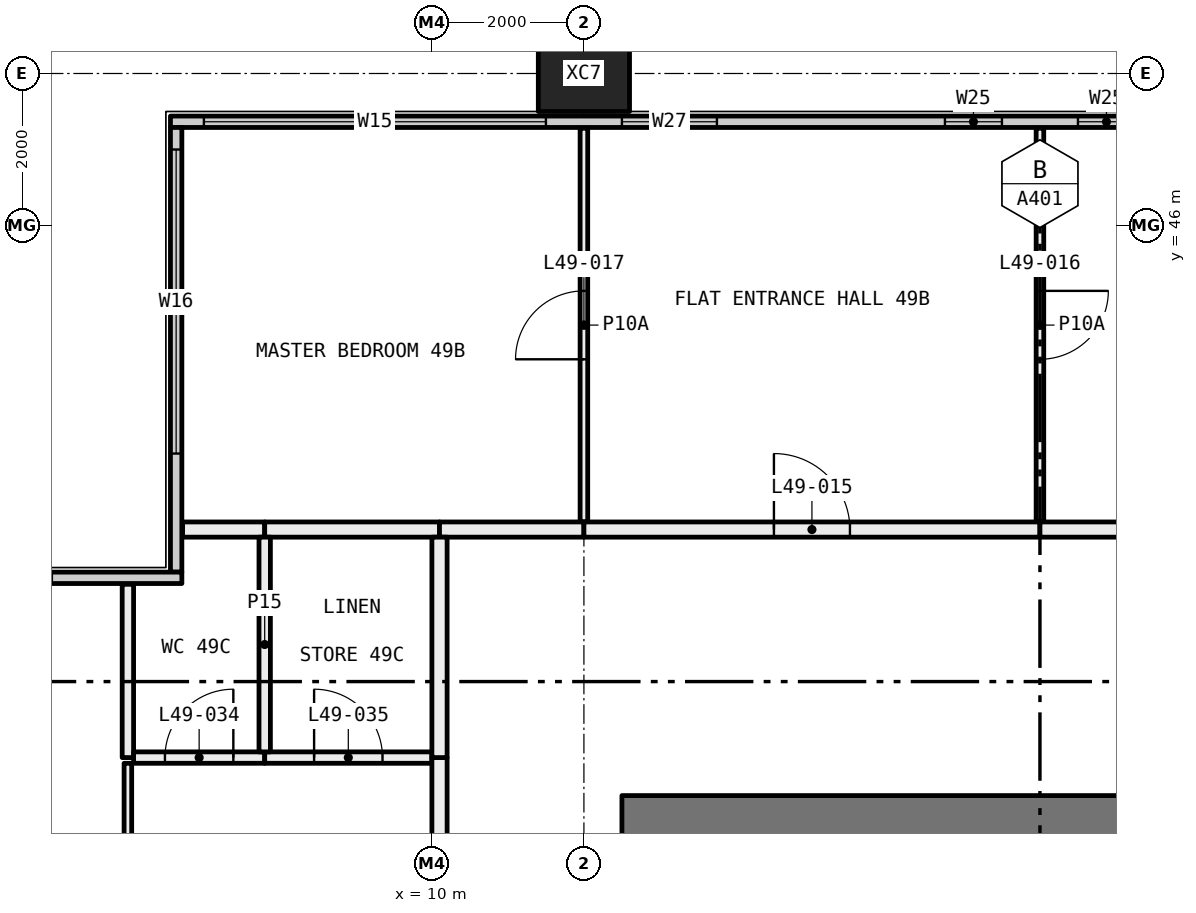
"""IFC4 building model, lengths in metres.
Left out: names, types, materials, properties, quantities, classifications, styles, units other than length and angle.
Written with IfcOpenShell. Run it as: python <this file> out.ifc"""

import sys

from ifc_helpers import new_model, si_unit, direction, frame, frame_2d, origin, origin_2d, place, context, subcontext, project, spatial, rectangle, hollow_rectangle, extrude, element, fill, save


model = new_model("IFC4")
c1 = context("Model", 3, precision=1e-05, world=origin(), true_north=direction((0.0, 1.0)))
c2 = subcontext(c1, "Body", "Model", "MODEL_VIEW")
j1 = project(units=[si_unit("LENGTHUNIT", "METRE"), si_unit("PLANEANGLEUNIT", "RADIAN")], contexts=[c1])
p1 = place(None, origin())
s1 = spatial("IfcSite", under=j1, at=p1, CompositionType="ELEMENT")
p2 = place(p1, origin())
s2 = spatial("IfcBuilding", under=s1, at=p2, CompositionType="ELEMENT")
p3 = place(p2, frame((0.0, 0.0, 185.85)))
s3 = spatial("IfcBuildingStorey", under=s2, at=p3, CompositionType="ELEMENT", Elevation=185.85)
p4 = place(p3, frame((12.0, 48.0, -0.4), z_axis=(0.0, 0.0, 1.0), x_axis=(1.0, 0.0, 0.0)))
e1 = element("IfcColumn", 1, at=p4, inside=s3, PredefinedType="COLUMN", context=c2, shape_type="SweptSolid", body=[
    extrude(hollow_rectangle(XDim=1.2, YDim=1.0, WallThickness=0.045, at=origin_2d()), origin(), (0.0, 0.0, 1.0), 3.45),
])
p5 = place(p3, frame((6.56, 47.365, 0.0), z_axis=(0.0, 0.0, 1.0), x_axis=(1.0, 0.0, 0.0)))
e2 = element("IfcWall", 2, at=p5, inside=s3, PredefinedType="ELEMENTEDWALL", context=c2, shape_type="SweptSolid", body=[
    extrude(rectangle(XDim=46.88, YDim=0.15, at=frame_2d((23.44, 0.0))), origin(), (0.0, 0.0, 1.0), 3.05),
])
p6 = place(p5, frame((0.44, 0.0, 0.45)))
e3 = element("IfcOpeningElement", 3, at=p6, cuts=e2, PredefinedType="OPENING", context=c2, shape_type="SweptSolid", body=[
    extrude(rectangle(XDim=4.5, YDim=2.55, at=frame_2d((2.25, 1.275))), frame((0.0, 0.085, 0.0), z_axis=(0.0, -1.0, 0.0), x_axis=(1.0, 0.0, 0.0)), (0.0, 0.0, 1.0), 0.17),
])
p7 = place(p5, frame((5.94, 0.0, 0.45)))
e4 = element("IfcOpeningElement", 4, at=p7, cuts=e2, PredefinedType="OPENING", context=c2, shape_type="SweptSolid", body=[
    extrude(rectangle(XDim=1.25, YDim=2.55, at=frame_2d((0.625, 1.275))), frame((0.0, 0.085, 0.0), z_axis=(0.0, -1.0, 0.0), x_axis=(1.0, 0.0, 0.0)), (0.0, 0.0, 1.0), 0.17),
])
p8 = place(p5, frame((10.19, 0.0, 0.45)))
e5 = element("IfcOpeningElement", 5, at=p8, cuts=e2, PredefinedType="OPENING", context=c2, shape_type="SweptSolid", body=[
    extrude(rectangle(XDim=0.75, YDim=2.55, at=frame_2d((0.375, 1.275))), frame((0.0, 0.085, 0.0), z_axis=(0.0, -1.0, 0.0), x_axis=(1.0, 0.0, 0.0)), (0.0, 0.0, 1.0), 0.17),
])
p9 = place(p5, frame((11.94, 0.0, 0.45)))
e6 = element("IfcOpeningElement", 6, at=p9, cuts=e2, PredefinedType="OPENING", context=c2, shape_type="SweptSolid", body=[
    extrude(rectangle(XDim=0.75, YDim=2.55, at=frame_2d((0.375, 1.275))), frame((0.0, 0.085, 0.0), z_axis=(0.0, -1.0, 0.0), x_axis=(1.0, 0.0, 0.0)), (0.0, 0.0, 1.0), 0.17),
])
p10 = place(p5, frame((15.69, 0.0, 0.45)))
e7 = element("IfcOpeningElement", 7, at=p10, cuts=e2, PredefinedType="OPENING", context=c2, shape_type="SweptSolid", body=[
    extrude(rectangle(XDim=1.25, YDim=2.55, at=frame_2d((0.625, 1.275))), frame((0.0, 0.085, 0.0), z_axis=(0.0, -1.0, 0.0), x_axis=(1.0, 0.0, 0.0)), (0.0, 0.0, 1.0), 0.17),
])
p11 = place(p5, frame((17.94, 0.0, 0.45)))
e8 = element("IfcOpeningElement", 8, at=p11, cuts=e2, PredefinedType="OPENING", context=c2, shape_type="SweptSolid", body=[
    extrude(rectangle(XDim=1.25, YDim=2.55, at=frame_2d((0.625, 1.275))), frame((0.0, 0.085, 0.0), z_axis=(0.0, -1.0, 0.0), x_axis=(1.0, 0.0, 0.0)), (0.0, 0.0, 1.0), 0.17),
])
p12 = place(p5, frame((22.19, 0.0, 0.45)))
e9 = element("IfcOpeningElement", 9, at=p12, cuts=e2, PredefinedType="OPENING", context=c2, shape_type="SweptSolid", body=[
    extrude(rectangle(XDim=0.75, YDim=2.55, at=frame_2d((0.375, 1.275))), frame((0.0, 0.085, 0.0), z_axis=(0.0, -1.0, 0.0), x_axis=(1.0, 0.0, 0.0)), (0.0, 0.0, 1.0), 0.17),
])
p13 = place(p5, frame((23.94, 0.0, 0.45)))
e10 = element("IfcOpeningElement", 10, at=p13, cuts=e2, PredefinedType="OPENING", context=c2, shape_type="SweptSolid", body=[
    extrude(rectangle(XDim=0.75, YDim=2.55, at=frame_2d((0.375, 1.275))), frame((0.0, 0.085, 0.0), z_axis=(0.0, -1.0, 0.0), x_axis=(1.0, 0.0, 0.0)), (0.0, 0.0, 1.0), 0.17),
])
p14 = place(p5, frame((27.69, 0.0, 0.45)))
e11 = element("IfcOpeningElement", 11, at=p14, cuts=e2, PredefinedType="OPENING", context=c2, shape_type="SweptSolid", body=[
    extrude(rectangle(XDim=1.25, YDim=2.55, at=frame_2d((0.625, 1.275))), frame((0.0, 0.085, 0.0), z_axis=(0.0, -1.0, 0.0), x_axis=(1.0, 0.0, 0.0)), (0.0, 0.0, 1.0), 0.17),
])
p15 = place(p5, frame((29.94, 0.0, 0.45)))
e12 = element("IfcOpeningElement", 12, at=p15, cuts=e2, PredefinedType="OPENING", context=c2, shape_type="SweptSolid", body=[
    extrude(rectangle(XDim=1.25, YDim=2.55, at=frame_2d((0.625, 1.275))), frame((0.0, 0.085, 0.0), z_axis=(0.0, -1.0, 0.0), x_axis=(1.0, 0.0, 0.0)), (0.0, 0.0, 1.0), 0.17),
])
p16 = place(p5, frame((34.19, 0.0, 0.45)))
e13 = element("IfcOpeningElement", 13, at=p16, cuts=e2, PredefinedType="OPENING", context=c2, shape_type="SweptSolid", body=[
    extrude(rectangle(XDim=0.75, YDim=2.55, at=frame_2d((0.375, 1.275))), frame((0.0, 0.085, 0.0), z_axis=(0.0, -1.0, 0.0), x_axis=(1.0, 0.0, 0.0)), (0.0, 0.0, 1.0), 0.17),
])
p17 = place(p5, frame((35.94, 0.0, 0.45)))
e14 = element("IfcOpeningElement", 14, at=p17, cuts=e2, PredefinedType="OPENING", context=c2, shape_type="SweptSolid", body=[
    extrude(rectangle(XDim=0.75, YDim=2.55, at=frame_2d((0.375, 1.275))), frame((0.0, 0.085, 0.0), z_axis=(0.0, -1.0, 0.0), x_axis=(1.0, 0.0, 0.0)), (0.0, 0.0, 1.0), 0.17),
])
p18 = place(p5, frame((39.69, 0.0, 0.45)))
e15 = element("IfcOpeningElement", 15, at=p18, cuts=e2, PredefinedType="OPENING", context=c2, shape_type="SweptSolid", body=[
    extrude(rectangle(XDim=1.25, YDim=2.55, at=frame_2d((0.625, 1.275))), frame((0.0, 0.085, 0.0), z_axis=(0.0, -1.0, 0.0), x_axis=(1.0, 0.0, 0.0)), (0.0, 0.0, 1.0), 0.17),
])
p19 = place(p5, frame((41.94, 0.0, 0.45)))
e16 = element("IfcOpeningElement", 16, at=p19, cuts=e2, PredefinedType="OPENING", context=c2, shape_type="SweptSolid", body=[
    extrude(rectangle(XDim=4.5, YDim=2.55, at=frame_2d((2.25, 1.275))), frame((0.0, 0.085, 0.0), z_axis=(0.0, -1.0, 0.0), x_axis=(1.0, 0.0, 0.0)), (0.0, 0.0, 1.0), 0.17),
])
p20 = place(p3, frame((6.635, 41.44, 0.0), z_axis=(0.0, 0.0, 1.0), x_axis=(0.0, 1.0, 0.0)))
e17 = element("IfcWall", 17, at=p20, inside=s3, PredefinedType="ELEMENTEDWALL", context=c2, shape_type="SweptSolid", body=[
    extrude(rectangle(XDim=5.85, YDim=0.15, at=frame_2d((2.925, 0.0))), origin(), (0.0, 0.0, 1.0), 3.05),
])
p21 = place(p20, frame((1.56, 0.0, 0.45)))
e18 = element("IfcOpeningElement", 18, at=p21, cuts=e17, PredefinedType="OPENING", context=c2, shape_type="SweptSolid", body=[
    extrude(rectangle(XDim=4.0, YDim=2.55, at=frame_2d((2.0, 1.275))), frame((0.0, 0.085, 0.0), z_axis=(0.0, -1.0, 0.0), x_axis=(1.0, 0.0, 0.0)), (0.0, 0.0, 1.0), 0.17),
])
p22 = place(p3, frame((0.56, 41.365, 0.0), z_axis=(0.0, 0.0, 1.0), x_axis=(1.0, 0.0, 0.0)))
e19 = element("IfcWall", 19, at=p22, inside=s3, PredefinedType="ELEMENTEDWALL", context=c2, shape_type="SweptSolid", body=[
    extrude(rectangle(XDim=6.15, YDim=0.15, at=frame_2d((3.075, 0.0))), origin(), (0.0, 0.0, 1.0), 3.05),
])
p23 = place(p22, frame((0.44, 0.0, 0.45)))
e20 = element("IfcOpeningElement", 20, at=p23, cuts=e19, PredefinedType="OPENING", context=c2, shape_type="SweptSolid", body=[
    extrude(rectangle(XDim=4.0, YDim=2.55, at=frame_2d((2.0, 1.275))), frame((0.0, 0.085, 0.0), z_axis=(0.0, -1.0, 0.0), x_axis=(1.0, 0.0, 0.0)), (0.0, 0.0, 1.0), 0.17),
])
p24 = place(p3, frame((12.0, 42.1, 0.0), z_axis=(0.0, 0.0, 1.0), x_axis=(0.0, 1.0, 0.0)))
e21 = element("IfcWall", 21, at=p24, inside=s3, PredefinedType="PARTITIONING", context=c2, shape_type="SweptSolid", body=[
    extrude(rectangle(XDim=5.18, YDim=0.1, at=frame_2d((2.59, 0.0))), origin(), (0.0, 0.0, 1.0), 3.05),
])
p25 = place(p24, frame((2.14, 0.0, 0.0)))
e22 = element("IfcOpeningElement", 22, at=p25, cuts=e21, PredefinedType="OPENING", context=c2, shape_type="SweptSolid", body=[
    extrude(rectangle(XDim=0.9, YDim=2.1, at=frame_2d((0.45, 1.05))), frame((0.0, 0.06, 0.0), z_axis=(0.0, -1.0, 0.0), x_axis=(1.0, 0.0, 0.0)), (0.0, 0.0, 1.0), 0.12),
])
p26 = place(p3, frame((6.72, 42.0, 0.0), z_axis=(0.0, 0.0, 1.0), x_axis=(1.0, 0.0, 0.0)))
e23 = element("IfcWall", 23, at=p26, inside=s3, PredefinedType="PARTITIONING", context=c2, shape_type="SweptSolid", body=[
    extrude(rectangle(XDim=1.08, YDim=0.2, at=frame_2d((0.54, 0.0))), origin(), (0.0, 0.0, 1.0), 3.05),
])
p27 = place(p3, frame((7.8, 42.0, 0.0), z_axis=(0.0, 0.0, 1.0), x_axis=(1.0, 0.0, 0.0)))
e24 = element("IfcWall", 24, at=p27, inside=s3, PredefinedType="PARTITIONING", context=c2, shape_type="SweptSolid", body=[
    extrude(rectangle(XDim=2.3, YDim=0.2, at=frame_2d((1.15, 0.0))), origin(), (0.0, 0.0, 1.0), 3.05),
])
p28 = place(p3, frame((10.1, 42.0, 0.0), z_axis=(0.0, 0.0, 1.0), x_axis=(1.0, 0.0, 0.0)))
e25 = element("IfcWall", 25, at=p28, inside=s3, PredefinedType="PARTITIONING", context=c2, shape_type="SweptSolid", body=[
    extrude(rectangle(XDim=1.9, YDim=0.2, at=frame_2d((0.95, 0.0))), origin(), (0.0, 0.0, 1.0), 3.05),
])
p29 = place(p3, frame((18.0, 42.1, 0.0), z_axis=(0.0, 0.0, 1.0), x_axis=(0.0, 1.0, 0.0)))
e26 = element("IfcWall", 26, at=p29, inside=s3, PredefinedType="PARTITIONING", context=c2, shape_type="SweptSolid", body=[
    extrude(rectangle(XDim=5.18, YDim=0.1, at=frame_2d((2.59, 0.0))), origin(), (0.0, 0.0, 1.0), 3.05),
])
p30 = place(p29, frame((2.14, 0.0, 0.0)))
e27 = element("IfcOpeningElement", 27, at=p30, cuts=e26, PredefinedType="OPENING", context=c2, shape_type="SweptSolid", body=[
    extrude(rectangle(XDim=0.9, YDim=2.1, at=frame_2d((0.45, 1.05))), frame((0.0, 0.06, 0.0), z_axis=(0.0, -1.0, 0.0), x_axis=(1.0, 0.0, 0.0)), (0.0, 0.0, 1.0), 0.12),
])
p31 = place(p3, frame((12.0, 42.0, 0.0), z_axis=(0.0, 0.0, 1.0), x_axis=(1.0, 0.0, 0.0)))
e28 = element("IfcWall", 28, at=p31, inside=s3, PredefinedType="PARTITIONING", context=c2, shape_type="SweptSolid", body=[
    extrude(rectangle(XDim=6.0, YDim=0.2, at=frame_2d((3.0, 0.0))), origin(), (0.0, 0.0, 1.0), 3.05),
])
p32 = place(p31, frame((2.5, 0.0, 0.0)))
e29 = element("IfcOpeningElement", 29, at=p32, cuts=e28, PredefinedType="OPENING", context=c2, shape_type="SweptSolid", body=[
    extrude(rectangle(XDim=1.0, YDim=2.1, at=frame_2d((0.5, 1.05))), frame((0.0, 0.11, 0.0), z_axis=(0.0, -1.0, 0.0), x_axis=(1.0, 0.0, 0.0)), (0.0, 0.0, 1.0), 0.22),
])
p33 = place(p3, frame((18.0, 42.0, 0.0), z_axis=(0.0, 0.0, 1.0), x_axis=(1.0, 0.0, 0.0)))
e30 = element("IfcWall", 30, at=p33, inside=s3, PredefinedType="PARTITIONING", context=c2, shape_type="SweptSolid", body=[
    extrude(rectangle(XDim=6.0, YDim=0.2, at=frame_2d((3.0, 0.0))), origin(), (0.0, 0.0, 1.0), 3.05),
])
p34 = place(p3, frame((6.0, 36.05, 0.0), z_axis=(0.0, 0.0, 1.0), x_axis=(0.0, 1.0, 0.0)))
e31 = element("IfcWall", 31, at=p34, inside=s3, PredefinedType="PARTITIONING", context=c2, shape_type="SweptSolid", body=[
    extrude(rectangle(XDim=2.875, YDim=0.1, at=frame_2d((1.438, 0.0))), origin(), (0.0, 0.0, 1.0), 2.45),
])
p35 = place(p3, frame((6.0, 39.0, 0.0), z_axis=(0.0, 0.0, 1.0), x_axis=(0.0, 1.0, 0.0)))
e32 = element("IfcWall", 32, at=p35, inside=s3, PredefinedType="PARTITIONING", context=c2, shape_type="SweptSolid", body=[
    extrude(rectangle(XDim=2.28, YDim=0.15, at=frame_2d((1.14, 0.0))), origin(), (0.0, 0.0, 1.0), 3.05),
])
p36 = place(p3, frame((7.8, 39.0, 0.0), z_axis=(0.0, 0.0, 1.0), x_axis=(-1.0, 0.0, 0.0)))
e33 = element("IfcWall", 33, at=p36, inside=s3, PredefinedType="PARTITIONING", context=c2, shape_type="SweptSolid", body=[
    extrude(rectangle(XDim=1.725, YDim=0.15, at=frame_2d((0.863, 0.0))), origin(), (0.0, 0.0, 1.0), 3.05),
])
p37 = place(p36, frame((0.413, 0.0, 0.0)))
e34 = element("IfcOpeningElement", 34, at=p37, cuts=e33, PredefinedType="OPENING", context=c2, shape_type="SweptSolid", body=[
    extrude(rectangle(XDim=0.9, YDim=2.1, at=frame_2d((0.45, 1.05))), frame((0.0, 0.085, 0.0), z_axis=(0.0, -1.0, 0.0), x_axis=(1.0, 0.0, 0.0)), (0.0, 0.0, 1.0), 0.17),
])
p38 = place(p3, frame((10.0, 39.0, 0.0), z_axis=(0.0, 0.0, 1.0), x_axis=(-1.0, 0.0, 0.0)))
e35 = element("IfcWall", 35, at=p38, inside=s3, PredefinedType="PARTITIONING", context=c2, shape_type="SweptSolid", body=[
    extrude(rectangle(XDim=2.2, YDim=0.15, at=frame_2d((1.1, 0.0))), origin(), (0.0, 0.0, 1.0), 3.05),
])
p39 = place(p38, frame((0.65, 0.0, 0.0)))
e36 = element("IfcOpeningElement", 36, at=p39, cuts=e35, PredefinedType="OPENING", context=c2, shape_type="SweptSolid", body=[
    extrude(rectangle(XDim=0.9, YDim=2.1, at=frame_2d((0.45, 1.05))), frame((0.0, 0.085, 0.0), z_axis=(0.0, -1.0, 0.0), x_axis=(1.0, 0.0, 0.0)), (0.0, 0.0, 1.0), 0.17),
])
p40 = place(p3, frame((10.1, 36.1, 0.0), z_axis=(0.0, 0.0, 1.0), x_axis=(0.0, 1.0, 0.0)))
e37 = element("IfcWall", 37, at=p40, inside=s3, PredefinedType="PARTITIONING", context=c2, shape_type="SweptSolid", body=[
    extrude(rectangle(XDim=2.9, YDim=0.2, at=frame_2d((1.45, 0.0))), origin(), (0.0, 0.0, 1.0), 3.05),
])
p41 = place(p3, frame((7.8, 39.075, 0.0), z_axis=(0.0, 0.0, 1.0), x_axis=(0.0, 1.0, 0.0)))
e38 = element("IfcWall", 38, at=p41, inside=s3, PredefinedType="PARTITIONING", context=c2, shape_type="SweptSolid", body=[
    extrude(rectangle(XDim=2.825, YDim=0.15, at=frame_2d((1.413, 0.0))), origin(), (0.0, 0.0, 1.0), 3.05),
])
p42 = place(p3, frame((10.1, 39.0, 0.0), z_axis=(0.0, 0.0, 1.0), x_axis=(0.0, 1.0, 0.0)))
e39 = element("IfcWall", 39, at=p42, inside=s3, PredefinedType="PARTITIONING", context=c2, shape_type="SweptSolid", body=[
    extrude(rectangle(XDim=2.9, YDim=0.2, at=frame_2d((1.45, 0.0))), origin(), (0.0, 0.0, 1.0), 3.05),
])
p43 = place(p3, frame((12.5, 38.225, 0.0), z_axis=(0.0, 0.0, 1.0), x_axis=(1.0, 0.0, 0.0)))
e40 = element("IfcWall", 40, at=p43, inside=s3, PredefinedType="SHEAR", context=c2, shape_type="SweptSolid", body=[
    extrude(rectangle(XDim=11.0, YDim=0.55, at=frame_2d((5.5, 0.0))), origin(), (0.0, 0.0, 1.0), 3.05),
])
p44 = place(p43, frame((8.525, 0.0, 0.0)))
e41 = element("IfcOpeningElement", 41, at=p44, cuts=e40, PredefinedType="OPENING", context=c2, shape_type="SweptSolid", body=[
    extrude(rectangle(XDim=1.6, YDim=2.1, at=frame_2d((0.8, 1.05))), frame((0.0, 0.285, 0.0), z_axis=(0.0, -1.0, 0.0), x_axis=(1.0, 0.0, 0.0)), (0.0, 0.0, 1.0), 0.57),
])
p45 = place(p6, origin())
e42 = element("IfcWindow", 42, at=p45, inside=s3, PartitioningType="SINGLE_PANEL", PredefinedType="WINDOW", context=c2, shape_type="SweptSolid", body=[
    extrude(rectangle(XDim=4.5, YDim=2.55, at=frame_2d((2.25, 1.275))), frame((0.0, 0.03, 0.0), z_axis=(0.0, -1.0, 0.0), x_axis=(1.0, 0.0, 0.0)), (0.0, 0.0, 1.0), 0.06),
])
fill(e3, e42)
p46 = place(p7, origin())
e43 = element("IfcWindow", 43, at=p46, inside=s3, PartitioningType="SINGLE_PANEL", PredefinedType="WINDOW", context=c2, shape_type="SweptSolid", body=[
    extrude(rectangle(XDim=1.25, YDim=2.55, at=frame_2d((0.625, 1.275))), frame((0.0, 0.03, 0.0), z_axis=(0.0, -1.0, 0.0), x_axis=(1.0, 0.0, 0.0)), (0.0, 0.0, 1.0), 0.06),
])
fill(e4, e43)
p47 = place(p8, origin())
e44 = element("IfcWindow", 44, at=p47, inside=s3, PartitioningType="SINGLE_PANEL", PredefinedType="WINDOW", context=c2, shape_type="SweptSolid", body=[
    extrude(rectangle(XDim=0.75, YDim=2.55, at=frame_2d((0.375, 1.275))), frame((0.0, 0.03, 0.0), z_axis=(0.0, -1.0, 0.0), x_axis=(1.0, 0.0, 0.0)), (0.0, 0.0, 1.0), 0.06),
])
fill(e5, e44)
p48 = place(p9, origin())
e45 = element("IfcWindow", 45, at=p48, inside=s3, PartitioningType="SINGLE_PANEL", PredefinedType="WINDOW", context=c2, shape_type="SweptSolid", body=[
    extrude(rectangle(XDim=0.75, YDim=2.55, at=frame_2d((0.375, 1.275))), frame((0.0, 0.03, 0.0), z_axis=(0.0, -1.0, 0.0), x_axis=(1.0, 0.0, 0.0)), (0.0, 0.0, 1.0), 0.06),
])
fill(e6, e45)
p49 = place(p21, origin())
e46 = element("IfcWindow", 46, at=p49, inside=s3, PartitioningType="SINGLE_PANEL", PredefinedType="WINDOW", context=c2, shape_type="SweptSolid", body=[
    extrude(rectangle(XDim=4.0, YDim=2.55, at=frame_2d((2.0, 1.275))), frame((0.0, 0.03, 0.0), z_axis=(0.0, -1.0, 0.0), x_axis=(1.0, 0.0, 0.0)), (0.0, 0.0, 1.0), 0.06),
])
fill(e18, e46)
p50 = place(p32, origin())
e47 = element("IfcDoor", 47, at=p50, inside=s3, OperationType="SINGLE_SWING_RIGHT", PredefinedType="DOOR", context=c2, shape_type="SweptSolid", body=[
    extrude(rectangle(XDim=1.0, YDim=2.1, at=frame_2d((0.5, 1.05))), frame((0.0, 0.025, 0.0), z_axis=(0.0, -1.0, 0.0), x_axis=(1.0, 0.0, 0.0)), (0.0, 0.0, 1.0), 0.05),
])
fill(e29, e47)
p51 = place(p30, frame((0.9, 0.0, 0.0), x_axis=(-1.0, 0.0, 0.0)))
e48 = element("IfcDoor", 48, at=p51, inside=s3, OperationType="SINGLE_SWING_RIGHT", PredefinedType="DOOR", context=c2, shape_type="SweptSolid", body=[
    extrude(rectangle(XDim=0.9, YDim=2.1, at=frame_2d((0.45, 1.05))), frame((0.0, 0.025, 0.0), z_axis=(0.0, -1.0, 0.0), x_axis=(1.0, 0.0, 0.0)), (0.0, 0.0, 1.0), 0.05),
])
fill(e27, e48)
p52 = place(p25, origin())
e49 = element("IfcDoor", 49, at=p52, inside=s3, OperationType="SINGLE_SWING_RIGHT", PredefinedType="DOOR", context=c2, shape_type="SweptSolid", body=[
    extrude(rectangle(XDim=0.9, YDim=2.1, at=frame_2d((0.45, 1.05))), frame((0.0, 0.025, 0.0), z_axis=(0.0, -1.0, 0.0), x_axis=(1.0, 0.0, 0.0)), (0.0, 0.0, 1.0), 0.05),
])
fill(e22, e49)
p53 = place(p37, frame((0.9, 0.0, 0.0), x_axis=(-1.0, 0.0, 0.0)))
e50 = element("IfcDoor", 50, at=p53, inside=s3, OperationType="SINGLE_SWING_LEFT", PredefinedType="DOOR", context=c2, shape_type="SweptSolid", body=[
    extrude(rectangle(XDim=0.9, YDim=2.1, at=frame_2d((0.45, 1.05))), frame((0.0, 0.025, 0.0), z_axis=(0.0, -1.0, 0.0), x_axis=(1.0, 0.0, 0.0)), (0.0, 0.0, 1.0), 0.05),
])
fill(e34, e50)
p54 = place(p39, frame((0.9, 0.0, 0.0), x_axis=(-1.0, 0.0, 0.0)))
e51 = element("IfcDoor", 51, at=p54, inside=s3, OperationType="SINGLE_SWING_RIGHT", PredefinedType="DOOR", context=c2, shape_type="SweptSolid", body=[
    extrude(rectangle(XDim=0.9, YDim=2.1, at=frame_2d((0.45, 1.05))), frame((0.0, 0.025, 0.0), z_axis=(0.0, -1.0, 0.0), x_axis=(1.0, 0.0, 0.0)), (0.0, 0.0, 1.0), 0.05),
])
fill(e36, e51)
save(model, sys.argv[1])
